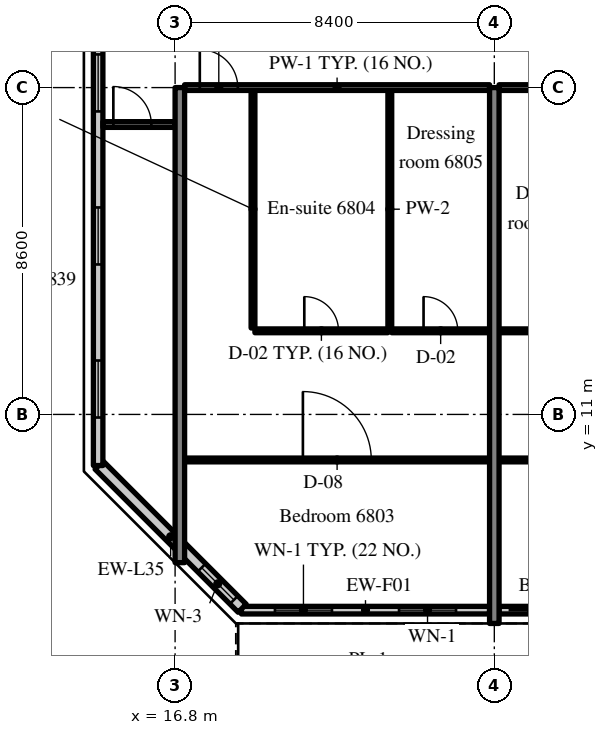
"""IFC4 building model, lengths in metres.
Left out: names, types, materials, properties, quantities, classifications, styles, units other than length and angle.
Written with IfcOpenShell. Run it as: python <this file> out.ifc"""

import sys

from ifc_helpers import new_model, si_unit, direction, frame, frame_2d, origin, place, context, subcontext, project, spatial, rectangle, extrude, source, transform, mapped, element, fill, save


model = new_model("IFC4")
c1 = context("Model", 3, precision=1e-05, world=origin(), true_north=direction((0.0, 1.0)))
c2 = subcontext(c1, "Body", "Model", "MODEL_VIEW")
j1 = project(units=[si_unit("LENGTHUNIT", "METRE"), si_unit("PLANEANGLEUNIT", "RADIAN")], contexts=[c1])
p1 = place(None, origin())
s1 = spatial("IfcSite", under=j1, at=p1, CompositionType="ELEMENT")
p2 = place(p1, origin())
s2 = spatial("IfcBuilding", under=s1, at=p2, CompositionType="ELEMENT")
p3 = place(p2, frame((0.0, 0.0, 285.7)))
s3 = spatial("IfcBuildingStorey", under=s2, at=p3, CompositionType="ELEMENT", Elevation=285.7)
m1 = source(origin(), c2, "Body", "SweptSolid", [
    extrude(rectangle(XDim=12.5, YDim=0.25, at=frame_2d((6.25, 0.0))), origin(), (0.0, 0.0, 1.0), 3.72),
])
p4 = place(p3, frame((16.925, 7.1, 0.0), z_axis=(0.0, 0.0, 1.0), x_axis=(0.0, 1.0, 0.0)))
e1 = element("IfcWall", 1, at=p4, inside=s3, PredefinedType="SHEAR", context=c2, shape_type="MappedRepresentation", body=[
    mapped(m1, transform((0.0, 0.0, 0.0), scale=1.0)),
])
m2 = source(origin(), c2, "Body", "SweptSolid", [
    extrude(rectangle(XDim=14.1, YDim=0.25, at=frame_2d((7.05, 0.0))), origin(), (0.0, 0.0, 1.0), 3.72),
])
p5 = place(p3, frame((25.2, 5.5, 0.0), z_axis=(0.0, 0.0, 1.0), x_axis=(0.0, 1.0, 0.0)))
e2 = element("IfcWall", 2, at=p5, inside=s3, PredefinedType="SHEAR", context=c2, shape_type="MappedRepresentation", body=[
    mapped(m2, transform((0.0, 0.0, 0.0), scale=1.0)),
])
m3 = source(origin(), c2, "Body", "SweptSolid", [
    extrude(rectangle(XDim=6.53, YDim=0.2, at=frame_2d((3.265, 0.0))), origin(), (0.0, 0.0, 1.0), 3.17),
])
p6 = place(p3, frame((18.545, 5.85, 0.0), z_axis=(0.0, 0.0, 1.0), x_axis=(1.0, 0.0, 0.0)))
e3 = element("IfcWall", 3, at=p6, inside=s3, PredefinedType="SOLIDWALL", context=c2, shape_type="MappedRepresentation", body=[
    mapped(m3, transform((0.0, 0.0, 0.0), scale=1.0)),
])
m4 = source(origin(), c2, "Body", "SweptSolid", [
    extrude(rectangle(XDim=1.5, YDim=1.5, at=frame_2d((0.75, 0.75))), frame((0.0, 0.11, 0.0), z_axis=(0.0, -1.0, 0.0), x_axis=(1.0, 0.0, 0.0)), (0.0, 0.0, 1.0), 0.22),
])
p7 = place(p6, frame((0.883, 0.0, 0.9)))
e4 = element("IfcOpeningElement", 4, at=p7, cuts=e3, PredefinedType="OPENING", context=c2, shape_type="MappedRepresentation", body=[
    mapped(m4, transform((0.0, 0.0, 0.0), scale=1.0)),
])
p8 = place(p6, frame((4.147, 0.0, 0.9)))
e5 = element("IfcOpeningElement", 5, at=p8, cuts=e3, PredefinedType="OPENING", context=c2, shape_type="MappedRepresentation", body=[
    mapped(m4, transform((0.0, 0.0, 0.0), scale=1.0)),
])
m5 = source(origin(), c2, "Body", "SweptSolid", [
    extrude(rectangle(XDim=8.15, YDim=0.2, at=frame_2d((4.075, 0.0))), origin(), (0.0, 0.0, 1.0), 3.17),
])
p9 = place(p3, frame((25.325, 5.85, 0.0), z_axis=(0.0, 0.0, 1.0), x_axis=(1.0, 0.0, 0.0)))
e6 = element("IfcWall", 6, at=p9, inside=s3, PredefinedType="SOLIDWALL", context=c2, shape_type="MappedRepresentation", body=[
    mapped(m5, transform((0.0, 0.0, 0.0), scale=1.0)),
])
m6 = source(origin(), c2, "Body", "SweptSolid", [
    extrude(rectangle(XDim=1.2, YDim=2.4, at=frame_2d((0.6, 1.2))), frame((0.0, 0.11, 0.0), z_axis=(0.0, -1.0, 0.0), x_axis=(1.0, 0.0, 0.0)), (0.0, 0.0, 1.0), 0.22),
])
p10 = place(p9, frame((0.25, 0.0, 0.0)))
e7 = element("IfcOpeningElement", 7, at=p10, cuts=e6, PredefinedType="OPENING", context=c2, shape_type="MappedRepresentation", body=[
    mapped(m6, transform((0.0, 0.0, 0.0), scale=1.0)),
])
p11 = place(p9, frame((2.325, 0.0, 0.9)))
e8 = element("IfcOpeningElement", 8, at=p11, cuts=e6, PredefinedType="OPENING", context=c2, shape_type="MappedRepresentation", body=[
    mapped(m4, transform((0.0, 0.0, 0.0), scale=1.0)),
])
p12 = place(p9, frame((4.325, 0.0, 0.0)))
e9 = element("IfcOpeningElement", 9, at=p12, cuts=e6, PredefinedType="OPENING", context=c2, shape_type="MappedRepresentation", body=[
    mapped(m6, transform((0.0, 0.0, 0.0), scale=1.0)),
])
p13 = place(p9, frame((6.4, 0.0, 0.9)))
e10 = element("IfcOpeningElement", 10, at=p13, cuts=e6, PredefinedType="OPENING", context=c2, shape_type="MappedRepresentation", body=[
    mapped(m4, transform((0.0, 0.0, 0.0), scale=1.0)),
])
m7 = source(origin(), c2, "Body", "SweptSolid", [
    extrude(rectangle(XDim=5.326, YDim=0.3, at=frame_2d((2.663, 0.0))), origin(), (0.0, 0.0, 1.0), 3.72),
])
p14 = place(p3, frame((14.8, 9.666, 0.0), z_axis=(0.0, 0.0, 1.0), x_axis=(0.707083859269, -0.707129702361, 0.0)))
e11 = element("IfcWall", 11, at=p14, inside=s3, PredefinedType="SOLIDWALL", context=c2, shape_type="MappedRepresentation", body=[
    mapped(m7, transform((0.0, 0.0, 0.0), scale=1.0)),
])
m8 = source(origin(), c2, "Body", "SweptSolid", [
    extrude(rectangle(XDim=1.2, YDim=1.5, at=frame_2d((0.6, 0.75))), frame((0.0, 0.16, 0.0), z_axis=(0.0, -1.0, 0.0), x_axis=(1.0, 0.0, 0.0)), (0.0, 0.0, 1.0), 0.32),
])
p15 = place(p14, frame((3.815, 0.0, 0.9)))
e12 = element("IfcOpeningElement", 12, at=p15, cuts=e11, PredefinedType="OPENING", context=c2, shape_type="MappedRepresentation", body=[
    mapped(m8, transform((0.0, 0.0, 0.0), scale=1.0)),
])
m9 = source(origin(), c2, "Body", "SweptSolid", [
    extrude(rectangle(XDim=28.189, YDim=0.25, at=frame_2d((14.095, 0.0))), origin(), (0.0, 0.0, 1.0), 3.72),
])
p16 = place(p3, frame((14.775, 37.845, 0.0), z_axis=(0.0, 0.0, 1.0), x_axis=(0.0, -1.0, 0.0)))
e13 = element("IfcWall", 13, at=p16, inside=s3, PredefinedType="SOLIDWALL", context=c2, shape_type="MappedRepresentation", body=[
    mapped(m9, transform((0.0, 0.0, 0.0), scale=1.0)),
])
m10 = source(origin(), c2, "Body", "SweptSolid", [
    extrude(rectangle(XDim=1.5, YDim=1.5, at=frame_2d((0.75, 0.75))), frame((0.0, 0.135, 0.0), z_axis=(0.0, -1.0, 0.0), x_axis=(1.0, 0.0, 0.0)), (0.0, 0.0, 1.0), 0.27),
])
p17 = place(p16, frame((1.263, 0.0, 0.9)))
e14 = element("IfcOpeningElement", 14, at=p17, cuts=e13, PredefinedType="OPENING", context=c2, shape_type="MappedRepresentation", body=[
    mapped(m10, transform((0.0, 0.0, 0.0), scale=1.0)),
])
p18 = place(p16, frame((5.291, 0.0, 0.9)))
e15 = element("IfcOpeningElement", 15, at=p18, cuts=e13, PredefinedType="OPENING", context=c2, shape_type="MappedRepresentation", body=[
    mapped(m10, transform((0.0, 0.0, 0.0), scale=1.0)),
])
p19 = place(p16, frame((9.318, 0.0, 0.9)))
e16 = element("IfcOpeningElement", 16, at=p19, cuts=e13, PredefinedType="OPENING", context=c2, shape_type="MappedRepresentation", body=[
    mapped(m10, transform((0.0, 0.0, 0.0), scale=1.0)),
])
p20 = place(p16, frame((13.345, 0.0, 0.9)))
e17 = element("IfcOpeningElement", 17, at=p20, cuts=e13, PredefinedType="OPENING", context=c2, shape_type="MappedRepresentation", body=[
    mapped(m10, transform((0.0, 0.0, 0.0), scale=1.0)),
])
p21 = place(p16, frame((17.372, 0.0, 0.9)))
e18 = element("IfcOpeningElement", 18, at=p21, cuts=e13, PredefinedType="OPENING", context=c2, shape_type="MappedRepresentation", body=[
    mapped(m10, transform((0.0, 0.0, 0.0), scale=1.0)),
])
p22 = place(p16, frame((21.399, 0.0, 0.9)))
e19 = element("IfcOpeningElement", 19, at=p22, cuts=e13, PredefinedType="OPENING", context=c2, shape_type="MappedRepresentation", body=[
    mapped(m10, transform((0.0, 0.0, 0.0), scale=1.0)),
])
p23 = place(p16, frame((25.426, 0.0, 0.9)))
e20 = element("IfcOpeningElement", 20, at=p23, cuts=e13, PredefinedType="OPENING", context=c2, shape_type="MappedRepresentation", body=[
    mapped(m10, transform((0.0, 0.0, 0.0), scale=1.0)),
])
m11 = source(origin(), c2, "Body", "SweptSolid", [
    extrude(rectangle(XDim=6.25, YDim=0.1, at=frame_2d((3.125, 0.0))), origin(), (0.0, 0.0, 1.0), 3.72),
])
for number, where, z_axis, x_axis in (
    (21, (18.85, 13.275, 0.0), (0.0, 0.0, 1.0), (0.0, 1.0, 0.0)),
    (22, (22.45, 13.275, 0.0), (0.0, 0.0, 1.0), (0.0, 1.0, 0.0)),
):
    element("IfcWall", number, at=place(p3, frame(where, z_axis=z_axis, x_axis=x_axis)), inside=s3, PredefinedType="PARTITIONING", context=c2, shape_type="MappedRepresentation", body=[
        mapped(m11, transform((0.0, 0.0, 0.0), scale=1.0)),
    ])
m12 = source(origin(), c2, "Body", "SweptSolid", [
    extrude(rectangle(XDim=3.5, YDim=0.1, at=frame_2d((1.75, 0.0))), origin(), (0.0, 0.0, 1.0), 3.72),
])
p24 = place(p3, frame((18.9, 13.2, 0.0), z_axis=(0.0, 0.0, 1.0), x_axis=(1.0, 0.0, 0.0)))
e23 = element("IfcWall", 23, at=p24, inside=s3, PredefinedType="PARTITIONING", context=c2, shape_type="MappedRepresentation", body=[
    mapped(m12, transform((0.0, 0.0, 0.0), scale=1.0)),
])
m13 = source(origin(), c2, "Body", "SweptSolid", [
    extrude(rectangle(XDim=0.9, YDim=2.1, at=frame_2d((0.45, 1.05))), frame((0.0, 0.06, 0.0), z_axis=(0.0, -1.0, 0.0), x_axis=(1.0, 0.0, 0.0)), (0.0, 0.0, 1.0), 0.12),
])
p25 = place(p24, frame((1.3, 0.0, 0.0)))
e24 = element("IfcOpeningElement", 24, at=p25, cuts=e23, PredefinedType="OPENING", context=c2, shape_type="MappedRepresentation", body=[
    mapped(m13, transform((0.0, 0.0, 0.0), scale=1.0)),
])
m14 = source(origin(), c2, "Body", "SweptSolid", [
    extrude(rectangle(XDim=2.575, YDim=0.1, at=frame_2d((1.288, 0.0))), origin(), (0.0, 0.0, 1.0), 3.72),
])
p26 = place(p3, frame((22.5, 13.2, 0.0), z_axis=(0.0, 0.0, 1.0), x_axis=(1.0, 0.0, 0.0)))
e25 = element("IfcWall", 25, at=p26, inside=s3, PredefinedType="PARTITIONING", context=c2, shape_type="MappedRepresentation", body=[
    mapped(m14, transform((0.0, 0.0, 0.0), scale=1.0)),
])
p27 = place(p26, frame((0.838, 0.0, 0.0)))
e26 = element("IfcOpeningElement", 26, at=p27, cuts=e25, PredefinedType="OPENING", context=c2, shape_type="MappedRepresentation", body=[
    mapped(m13, transform((0.0, 0.0, 0.0), scale=1.0)),
])
m15 = source(origin(), c2, "Body", "SweptSolid", [
    extrude(rectangle(XDim=8.025, YDim=0.1, at=frame_2d((4.012, 0.0))), origin(), (0.0, 0.0, 1.0), 3.72),
])
p28 = place(p3, frame((17.05, 9.802, 0.0), z_axis=(0.0, 0.0, 1.0), x_axis=(1.0, 0.0, 0.0)))
e27 = element("IfcWall", 27, at=p28, inside=s3, PredefinedType="PARTITIONING", context=c2, shape_type="MappedRepresentation", body=[
    mapped(m15, transform((0.0, 0.0, 0.0), scale=1.0)),
])
m16 = source(origin(), c2, "Body", "SweptSolid", [
    extrude(rectangle(XDim=1.8, YDim=2.1, at=frame_2d((0.9, 1.05))), frame((0.0, 0.06, 0.0), z_axis=(0.0, -1.0, 0.0), x_axis=(1.0, 0.0, 0.0)), (0.0, 0.0, 1.0), 0.12),
])
p29 = place(p28, frame((3.113, 0.0, 0.0)))
e28 = element("IfcOpeningElement", 28, at=p29, cuts=e27, PredefinedType="OPENING", context=c2, shape_type="MappedRepresentation", body=[
    mapped(m16, transform((0.0, 0.0, 0.0), scale=1.0)),
])
m17 = source(origin(), c2, "Body", "SweptSolid", [
    extrude(rectangle(XDim=8.025, YDim=0.15, at=frame_2d((4.012, 0.0))), origin(), (0.0, 0.0, 1.0), 3.02),
])
p30 = place(p3, frame((17.05, 19.6, 0.0), z_axis=(0.0, 0.0, 1.0), x_axis=(1.0, 0.0, 0.0)))
e29 = element("IfcWall", 29, at=p30, inside=s3, PredefinedType="PARTITIONING", context=c2, shape_type="MappedRepresentation", body=[
    mapped(m17, transform((0.0, 0.0, 0.0), scale=1.0)),
])
m18 = source(origin(), c2, "Body", "SweptSolid", [
    extrude(rectangle(XDim=1.0, YDim=2.1, at=frame_2d((0.5, 1.05))), frame((0.0, 0.085, 0.0), z_axis=(0.0, -1.0, 0.0), x_axis=(1.0, 0.0, 0.0)), (0.0, 0.0, 1.0), 0.17),
])
p31 = place(p30, frame((0.4, 0.0, 0.0)))
e30 = element("IfcOpeningElement", 30, at=p31, cuts=e29, PredefinedType="OPENING", context=c2, shape_type="MappedRepresentation", body=[
    mapped(m18, transform((0.0, 0.0, 0.0), scale=1.0)),
])
m19 = source(origin(), c2, "Body", "SweptSolid", [
    extrude(rectangle(XDim=2.7, YDim=0.1, at=frame_2d((1.35, 0.0))), origin(), (0.0, 0.0, 1.0), 3.72),
])
p32 = place(p3, frame((25.325, 13.2, 0.0), z_axis=(0.0, 0.0, 1.0), x_axis=(1.0, 0.0, 0.0)))
e31 = element("IfcWall", 31, at=p32, inside=s3, PredefinedType="PARTITIONING", context=c2, shape_type="MappedRepresentation", body=[
    mapped(m19, transform((0.0, 0.0, 0.0), scale=1.0)),
])
p33 = place(p32, frame((0.9, 0.0, 0.0)))
e32 = element("IfcOpeningElement", 32, at=p33, cuts=e31, PredefinedType="OPENING", context=c2, shape_type="MappedRepresentation", body=[
    mapped(m13, transform((0.0, 0.0, 0.0), scale=1.0)),
])
m20 = source(origin(), c2, "Body", "SweptSolid", [
    extrude(rectangle(XDim=8.15, YDim=0.1, at=frame_2d((4.075, 0.0))), origin(), (0.0, 0.0, 1.0), 3.72),
])
p34 = place(p3, frame((25.325, 9.802, 0.0), z_axis=(0.0, 0.0, 1.0), x_axis=(1.0, 0.0, 0.0)))
e33 = element("IfcWall", 33, at=p34, inside=s3, PredefinedType="PARTITIONING", context=c2, shape_type="MappedRepresentation", body=[
    mapped(m20, transform((0.0, 0.0, 0.0), scale=1.0)),
])
p35 = place(p34, frame((3.175, 0.0, 0.0)))
e34 = element("IfcOpeningElement", 34, at=p35, cuts=e33, PredefinedType="OPENING", context=c2, shape_type="MappedRepresentation", body=[
    mapped(m16, transform((0.0, 0.0, 0.0), scale=1.0)),
])
m21 = source(origin(), c2, "Body", "SweptSolid", [
    extrude(rectangle(XDim=8.15, YDim=0.15, at=frame_2d((4.075, 0.0))), origin(), (0.0, 0.0, 1.0), 3.02),
])
p36 = place(p3, frame((25.325, 19.6, 0.0), z_axis=(0.0, 0.0, 1.0), x_axis=(1.0, 0.0, 0.0)))
e35 = element("IfcWall", 35, at=p36, inside=s3, PredefinedType="PARTITIONING", context=c2, shape_type="MappedRepresentation", body=[
    mapped(m21, transform((0.0, 0.0, 0.0), scale=1.0)),
])
p37 = place(p36, frame((6.75, 0.0, 0.0)))
e36 = element("IfcOpeningElement", 36, at=p37, cuts=e35, PredefinedType="OPENING", context=c2, shape_type="MappedRepresentation", body=[
    mapped(m18, transform((0.0, 0.0, 0.0), scale=1.0)),
])
m22 = source(origin(), c2, "Body", "SweptSolid", [
    extrude(rectangle(XDim=1.9, YDim=0.15, at=frame_2d((0.95, 0.0))), origin(), (0.0, 0.0, 1.0), 3.02),
])
p38 = place(p3, frame((14.9, 18.628, 0.0), z_axis=(0.0, 0.0, 1.0), x_axis=(1.0, 0.0, 0.0)))
e37 = element("IfcWall", 37, at=p38, inside=s3, PredefinedType="PARTITIONING", context=c2, shape_type="MappedRepresentation", body=[
    mapped(m22, transform((0.0, 0.0, 0.0), scale=1.0)),
])
p39 = place(p38, frame((0.275, 0.0, 0.0)))
e38 = element("IfcOpeningElement", 38, at=p39, cuts=e37, PredefinedType="OPENING", context=c2, shape_type="MappedRepresentation", body=[
    mapped(m18, transform((0.0, 0.0, 0.0), scale=1.0)),
])
m23 = source(origin(), c2, "Body", "SweptSolid", [
    extrude(rectangle(XDim=1.5, YDim=1.5, at=frame_2d((0.75, 0.75))), frame((0.0, 0.03, 0.0), z_axis=(0.0, -1.0, 0.0), x_axis=(1.0, 0.0, 0.0)), (0.0, 0.0, 1.0), 0.06),
])
p40 = place(p7, origin())
e39 = element("IfcWindow", 39, at=p40, inside=s3, PartitioningType="SINGLE_PANEL", PredefinedType="WINDOW", context=c2, shape_type="MappedRepresentation", body=[
    mapped(m23, transform((0.0, 0.0, 0.0), scale=1.0)),
])
fill(e4, e39)
p41 = place(p8, origin())
e40 = element("IfcWindow", 40, at=p41, inside=s3, PartitioningType="SINGLE_PANEL", PredefinedType="WINDOW", context=c2, shape_type="MappedRepresentation", body=[
    mapped(m23, transform((0.0, 0.0, 0.0), scale=1.0)),
])
fill(e5, e40)
m24 = source(origin(), c2, "Body", "SweptSolid", [
    extrude(rectangle(XDim=1.2, YDim=2.4, at=frame_2d((0.6, 1.2))), frame((0.0, 0.025, 0.0), z_axis=(0.0, -1.0, 0.0), x_axis=(1.0, 0.0, 0.0)), (0.0, 0.0, 1.0), 0.05),
])
p42 = place(p10, origin())
e41 = element("IfcDoor", 41, at=p42, inside=s3, OperationType="SLIDING_TO_LEFT", PredefinedType="DOOR", context=c2, shape_type="MappedRepresentation", body=[
    mapped(m24, transform((0.0, 0.0, 0.0), scale=1.0)),
])
fill(e7, e41)
m25 = source(origin(), c2, "Body", "SweptSolid", [
    extrude(rectangle(XDim=1.2, YDim=1.5, at=frame_2d((0.6, 0.75))), frame((0.0, 0.03, 0.0), z_axis=(0.0, -1.0, 0.0), x_axis=(1.0, 0.0, 0.0)), (0.0, 0.0, 1.0), 0.06),
])
p43 = place(p15, origin())
e42 = element("IfcWindow", 42, at=p43, inside=s3, PartitioningType="SINGLE_PANEL", PredefinedType="WINDOW", context=c2, shape_type="MappedRepresentation", body=[
    mapped(m25, transform((0.0, 0.0, 0.0), scale=1.0)),
])
fill(e12, e42)
p44 = place(p21, origin())
e43 = element("IfcWindow", 43, at=p44, inside=s3, PartitioningType="SINGLE_PANEL", PredefinedType="WINDOW", context=c2, shape_type="MappedRepresentation", body=[
    mapped(m23, transform((0.0, 0.0, 0.0), scale=1.0)),
])
fill(e18, e43)
p45 = place(p22, origin())
e44 = element("IfcWindow", 44, at=p45, inside=s3, PartitioningType="SINGLE_PANEL", PredefinedType="WINDOW", context=c2, shape_type="MappedRepresentation", body=[
    mapped(m23, transform((0.0, 0.0, 0.0), scale=1.0)),
])
fill(e19, e44)
p46 = place(p23, origin())
e45 = element("IfcWindow", 45, at=p46, inside=s3, PartitioningType="SINGLE_PANEL", PredefinedType="WINDOW", context=c2, shape_type="MappedRepresentation", body=[
    mapped(m23, transform((0.0, 0.0, 0.0), scale=1.0)),
])
fill(e20, e45)
m26 = source(origin(), c2, "Body", "SweptSolid", [
    extrude(rectangle(XDim=0.9, YDim=2.1, at=frame_2d((0.45, 1.05))), frame((0.0, 0.025, 0.0), z_axis=(0.0, -1.0, 0.0), x_axis=(1.0, 0.0, 0.0)), (0.0, 0.0, 1.0), 0.05),
])
p47 = place(p25, origin())
e46 = element("IfcDoor", 46, at=p47, inside=s3, OperationType="SINGLE_SWING_LEFT", PredefinedType="DOOR", context=c2, shape_type="MappedRepresentation", body=[
    mapped(m26, transform((0.0, 0.0, 0.0), scale=1.0)),
])
fill(e24, e46)
p48 = place(p27, origin())
e47 = element("IfcDoor", 47, at=p48, inside=s3, OperationType="SINGLE_SWING_LEFT", PredefinedType="DOOR", context=c2, shape_type="MappedRepresentation", body=[
    mapped(m26, transform((0.0, 0.0, 0.0), scale=1.0)),
])
fill(e26, e47)
m27 = source(origin(), c2, "Body", "SweptSolid", [
    extrude(rectangle(XDim=1.8, YDim=2.1, at=frame_2d((0.9, 1.05))), frame((0.0, 0.025, 0.0), z_axis=(0.0, -1.0, 0.0), x_axis=(1.0, 0.0, 0.0)), (0.0, 0.0, 1.0), 0.05),
])
p49 = place(p29, origin())
e48 = element("IfcDoor", 48, at=p49, inside=s3, OperationType="DOUBLE_DOOR_SINGLE_SWING", PredefinedType="DOOR", context=c2, shape_type="MappedRepresentation", body=[
    mapped(m27, transform((0.0, 0.0, 0.0), scale=1.0)),
])
fill(e28, e48)
m28 = source(origin(), c2, "Body", "SweptSolid", [
    extrude(rectangle(XDim=1.0, YDim=2.1, at=frame_2d((0.5, 1.05))), frame((0.0, 0.025, 0.0), z_axis=(0.0, -1.0, 0.0), x_axis=(1.0, 0.0, 0.0)), (0.0, 0.0, 1.0), 0.05),
])
p50 = place(p31, origin())
e49 = element("IfcDoor", 49, at=p50, inside=s3, OperationType="SINGLE_SWING_LEFT", PredefinedType="DOOR", context=c2, shape_type="MappedRepresentation", body=[
    mapped(m28, transform((0.0, 0.0, 0.0), scale=1.0)),
])
fill(e30, e49)
p51 = place(p39, origin())
e50 = element("IfcDoor", 50, at=p51, inside=s3, OperationType="SINGLE_SWING_LEFT", PredefinedType="DOOR", context=c2, shape_type="MappedRepresentation", body=[
    mapped(m28, transform((0.0, 0.0, 0.0), scale=1.0)),
])
fill(e38, e50)
save(model, sys.argv[1])
